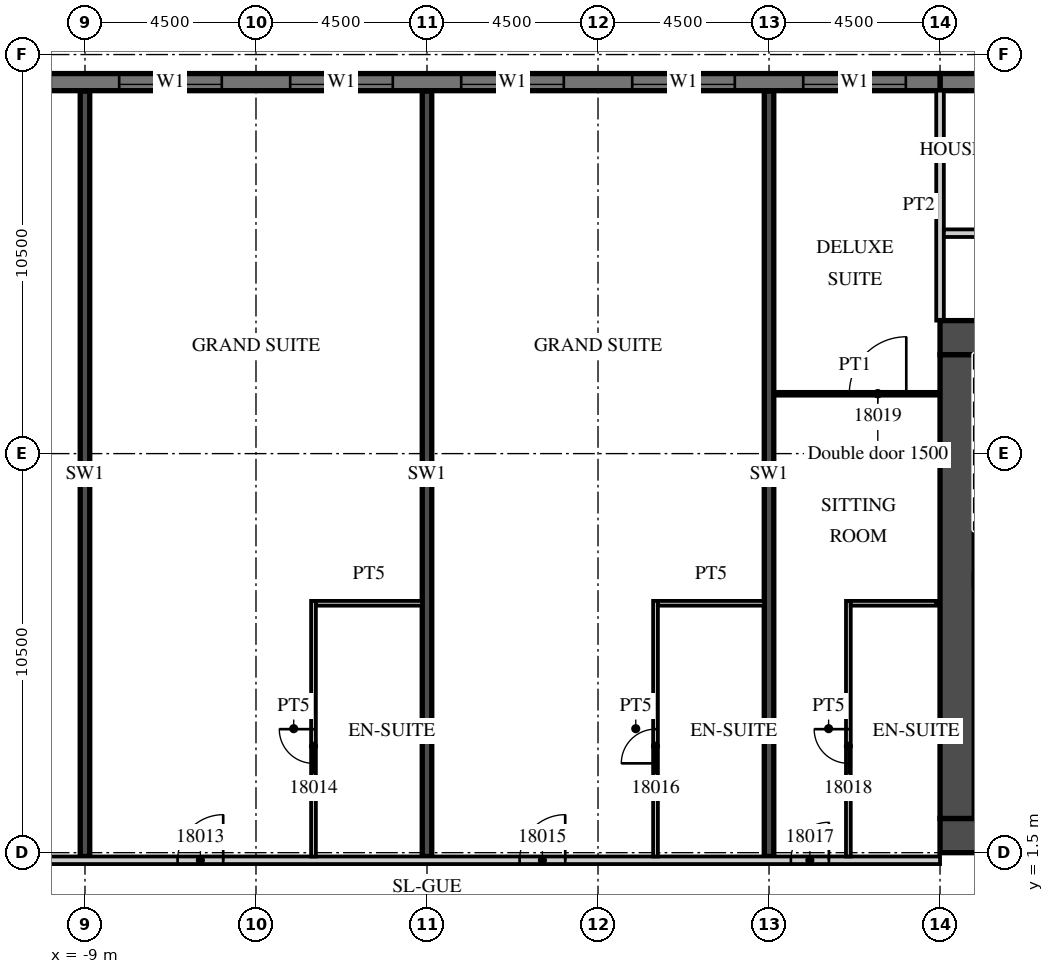
"""IFC4 building model, lengths in metres.
Left out: names, types, materials, properties, quantities, classifications, styles, units other than length and angle.
Written with IfcOpenShell. Run it as: python <this file> out.ifc"""

import sys

from ifc_helpers import new_model, si_unit, direction, frame, frame_2d, origin, place, context, subcontext, project, spatial, rectangle, extrude, element, fill, save


model = new_model("IFC4")
c1 = context("Model", 3, precision=1e-05, world=origin(), true_north=direction((0.0, 1.0)))
c2 = subcontext(c1, "Body", "Model", "MODEL_VIEW")
j1 = project(units=[si_unit("LENGTHUNIT", "METRE"), si_unit("PLANEANGLEUNIT", "RADIAN")], contexts=[c1])
p1 = place(None, origin())
s1 = spatial("IfcSite", under=j1, at=p1, CompositionType="ELEMENT")
p2 = place(p1, origin())
s2 = spatial("IfcBuilding", under=s1, at=p2, CompositionType="ELEMENT")
p3 = place(p2, frame((0.0, 0.0, 89.7)))
s3 = spatial("IfcBuildingStorey", under=s2, at=p3, CompositionType="ELEMENT", Elevation=89.7)
for number, where, z_axis, x_axis in (
    (1, (-9.0, 1.4, 0.0), (0.0, 0.0, 1.0), (0.0, 1.0, 0.0)),
    (2, (0.0, 1.4, 0.0), (0.0, 0.0, 1.0), (0.0, 1.0, 0.0)),
    (3, (9.0, 1.4, 0.0), (0.0, 0.0, 1.0), (0.0, 1.0, 0.0)),
):
    element("IfcWall", number, at=place(p3, frame(where, z_axis=z_axis, x_axis=x_axis)), inside=s3, PredefinedType="SHEAR", context=c2, shape_type="SweptSolid", body=[
        extrude(rectangle(XDim=20.14, YDim=0.25, at=frame_2d((10.07, 0.0))), origin(), (0.0, 0.0, 1.0), 3.3),
    ])
p4 = place(p3, frame((31.5, 21.775, 0.0), z_axis=(0.0, 0.0, 1.0), x_axis=(-1.0, 0.0, 0.0)))
e4 = element("IfcWall", 4, at=p4, inside=s3, PredefinedType="SOLIDWALL", context=c2, shape_type="SweptSolid", body=[
    extrude(rectangle(XDim=18.0, YDim=0.45, at=frame_2d((9.0, 0.0))), origin(), (0.0, 0.0, 1.0), 3.02),
])
p5 = place(p3, frame((13.5, 21.775, 0.0), z_axis=(0.0, 0.0, 1.0), x_axis=(-1.0, 0.0, 0.0)))
e5 = element("IfcWall", 5, at=p5, inside=s3, PredefinedType="SOLIDWALL", context=c2, shape_type="SweptSolid", body=[
    extrude(rectangle(XDim=54.5, YDim=0.45, at=frame_2d((27.25, 0.0))), origin(), (0.0, 0.0, 1.0), 3.02),
])
p6 = place(p5, frame((0.9, 0.0, 0.45)))
e6 = element("IfcOpeningElement", 6, at=p6, cuts=e5, PredefinedType="OPENING", context=c2, shape_type="SweptSolid", body=[
    extrude(rectangle(XDim=2.7, YDim=2.25, at=frame_2d((1.35, 1.125))), frame((0.0, 0.235, 0.0), z_axis=(0.0, -1.0, 0.0), x_axis=(1.0, 0.0, 0.0)), (0.0, 0.0, 1.0), 0.47),
])
p7 = place(p5, frame((5.4, 0.0, 0.45)))
e7 = element("IfcOpeningElement", 7, at=p7, cuts=e5, PredefinedType="OPENING", context=c2, shape_type="SweptSolid", body=[
    extrude(rectangle(XDim=2.7, YDim=2.25, at=frame_2d((1.35, 1.125))), frame((0.0, 0.235, 0.0), z_axis=(0.0, -1.0, 0.0), x_axis=(1.0, 0.0, 0.0)), (0.0, 0.0, 1.0), 0.47),
])
p8 = place(p5, frame((9.9, 0.0, 0.45)))
e8 = element("IfcOpeningElement", 8, at=p8, cuts=e5, PredefinedType="OPENING", context=c2, shape_type="SweptSolid", body=[
    extrude(rectangle(XDim=2.7, YDim=2.25, at=frame_2d((1.35, 1.125))), frame((0.0, 0.235, 0.0), z_axis=(0.0, -1.0, 0.0), x_axis=(1.0, 0.0, 0.0)), (0.0, 0.0, 1.0), 0.47),
])
p9 = place(p5, frame((14.4, 0.0, 0.45)))
e9 = element("IfcOpeningElement", 9, at=p9, cuts=e5, PredefinedType="OPENING", context=c2, shape_type="SweptSolid", body=[
    extrude(rectangle(XDim=2.7, YDim=2.25, at=frame_2d((1.35, 1.125))), frame((0.0, 0.235, 0.0), z_axis=(0.0, -1.0, 0.0), x_axis=(1.0, 0.0, 0.0)), (0.0, 0.0, 1.0), 0.47),
])
p10 = place(p5, frame((18.9, 0.0, 0.45)))
e10 = element("IfcOpeningElement", 10, at=p10, cuts=e5, PredefinedType="OPENING", context=c2, shape_type="SweptSolid", body=[
    extrude(rectangle(XDim=2.7, YDim=2.25, at=frame_2d((1.35, 1.125))), frame((0.0, 0.235, 0.0), z_axis=(0.0, -1.0, 0.0), x_axis=(1.0, 0.0, 0.0)), (0.0, 0.0, 1.0), 0.47),
])
p11 = place(p5, frame((23.4, 0.0, 0.45)))
e11 = element("IfcOpeningElement", 11, at=p11, cuts=e5, PredefinedType="OPENING", context=c2, shape_type="SweptSolid", body=[
    extrude(rectangle(XDim=2.7, YDim=2.25, at=frame_2d((1.35, 1.125))), frame((0.0, 0.235, 0.0), z_axis=(0.0, -1.0, 0.0), x_axis=(1.0, 0.0, 0.0)), (0.0, 0.0, 1.0), 0.47),
])
p12 = place(p5, frame((27.9, 0.0, 0.45)))
e12 = element("IfcOpeningElement", 12, at=p12, cuts=e5, PredefinedType="OPENING", context=c2, shape_type="SweptSolid", body=[
    extrude(rectangle(XDim=2.7, YDim=2.25, at=frame_2d((1.35, 1.125))), frame((0.0, 0.235, 0.0), z_axis=(0.0, -1.0, 0.0), x_axis=(1.0, 0.0, 0.0)), (0.0, 0.0, 1.0), 0.47),
])
p13 = place(p5, frame((32.4, 0.0, 0.45)))
e13 = element("IfcOpeningElement", 13, at=p13, cuts=e5, PredefinedType="OPENING", context=c2, shape_type="SweptSolid", body=[
    extrude(rectangle(XDim=2.7, YDim=2.25, at=frame_2d((1.35, 1.125))), frame((0.0, 0.235, 0.0), z_axis=(0.0, -1.0, 0.0), x_axis=(1.0, 0.0, 0.0)), (0.0, 0.0, 1.0), 0.47),
])
p14 = place(p5, frame((36.9, 0.0, 0.45)))
e14 = element("IfcOpeningElement", 14, at=p14, cuts=e5, PredefinedType="OPENING", context=c2, shape_type="SweptSolid", body=[
    extrude(rectangle(XDim=2.7, YDim=2.25, at=frame_2d((1.35, 1.125))), frame((0.0, 0.235, 0.0), z_axis=(0.0, -1.0, 0.0), x_axis=(1.0, 0.0, 0.0)), (0.0, 0.0, 1.0), 0.47),
])
p15 = place(p5, frame((41.4, 0.0, 0.45)))
e15 = element("IfcOpeningElement", 15, at=p15, cuts=e5, PredefinedType="OPENING", context=c2, shape_type="SweptSolid", body=[
    extrude(rectangle(XDim=2.7, YDim=2.25, at=frame_2d((1.35, 1.125))), frame((0.0, 0.235, 0.0), z_axis=(0.0, -1.0, 0.0), x_axis=(1.0, 0.0, 0.0)), (0.0, 0.0, 1.0), 0.47),
])
p16 = place(p5, frame((45.9, 0.0, 0.45)))
e16 = element("IfcOpeningElement", 16, at=p16, cuts=e5, PredefinedType="OPENING", context=c2, shape_type="SweptSolid", body=[
    extrude(rectangle(XDim=2.7, YDim=2.25, at=frame_2d((1.35, 1.125))), frame((0.0, 0.235, 0.0), z_axis=(0.0, -1.0, 0.0), x_axis=(1.0, 0.0, 0.0)), (0.0, 0.0, 1.0), 0.47),
])
p17 = place(p5, frame((50.4, 0.0, 0.45)))
e17 = element("IfcOpeningElement", 17, at=p17, cuts=e5, PredefinedType="OPENING", context=c2, shape_type="SweptSolid", body=[
    extrude(rectangle(XDim=2.7, YDim=2.25, at=frame_2d((1.35, 1.125))), frame((0.0, 0.235, 0.0), z_axis=(0.0, -1.0, 0.0), x_axis=(1.0, 0.0, 0.0)), (0.0, 0.0, 1.0), 0.47),
])
p18 = place(p3, frame((13.5, 15.5, 0.0), z_axis=(0.0, 0.0, 1.0), x_axis=(0.0, 1.0, 0.0)))
e18 = element("IfcWall", 18, at=p18, inside=s3, PredefinedType="PARTITIONING", context=c2, shape_type="SweptSolid", body=[
    extrude(rectangle(XDim=6.05, YDim=0.2, at=frame_2d((3.025, 0.0))), origin(), (0.0, 0.0, 1.0), 3.02),
])
p19 = place(p3, frame((-44.55, 1.3, 0.0), z_axis=(0.0, 0.0, 1.0), x_axis=(1.0, 0.0, 0.0)))
e19 = element("IfcWall", 19, at=p19, inside=s3, PredefinedType="PARTITIONING", context=c2, shape_type="SweptSolid", body=[
    extrude(rectangle(XDim=58.05, YDim=0.2, at=frame_2d((29.025, 0.0))), origin(), (0.0, 0.0, 1.0), 3.02),
])
p20 = place(p19, frame((0.525, 0.0, 0.0)))
e20 = element("IfcOpeningElement", 20, at=p20, cuts=e19, PredefinedType="OPENING", context=c2, shape_type="SweptSolid", body=[
    extrude(rectangle(XDim=1.0, YDim=2.1, at=frame_2d((0.5, 1.05))), frame((0.0, 0.11, 0.0), z_axis=(0.0, -1.0, 0.0), x_axis=(1.0, 0.0, 0.0)), (0.0, 0.0, 1.0), 0.22),
])
p21 = place(p19, frame((6.975, 0.0, 0.0)))
e21 = element("IfcOpeningElement", 21, at=p21, cuts=e19, PredefinedType="OPENING", context=c2, shape_type="SweptSolid", body=[
    extrude(rectangle(XDim=1.0, YDim=2.1, at=frame_2d((0.5, 1.05))), frame((0.0, 0.11, 0.0), z_axis=(0.0, -1.0, 0.0), x_axis=(1.0, 0.0, 0.0)), (0.0, 0.0, 1.0), 0.22),
])
p22 = place(p19, frame((11.5, 0.0, 0.0)))
e22 = element("IfcOpeningElement", 22, at=p22, cuts=e19, PredefinedType="OPENING", context=c2, shape_type="SweptSolid", body=[
    extrude(rectangle(XDim=1.0, YDim=2.1, at=frame_2d((0.5, 1.05))), frame((0.0, 0.11, 0.0), z_axis=(0.0, -1.0, 0.0), x_axis=(1.0, 0.0, 0.0)), (0.0, 0.0, 1.0), 0.22),
])
p23 = place(p19, frame((13.6, 0.0, 0.0)))
e23 = element("IfcOpeningElement", 23, at=p23, cuts=e19, PredefinedType="OPENING", context=c2, shape_type="SweptSolid", body=[
    extrude(rectangle(XDim=1.0, YDim=2.1, at=frame_2d((0.5, 1.05))), frame((0.0, 0.11, 0.0), z_axis=(0.0, -1.0, 0.0), x_axis=(1.0, 0.0, 0.0)), (0.0, 0.0, 1.0), 0.22),
])
p24 = place(p19, frame((22.912, 0.0, 0.0)))
e24 = element("IfcOpeningElement", 24, at=p24, cuts=e19, PredefinedType="OPENING", context=c2, shape_type="SweptSolid", body=[
    extrude(rectangle(XDim=1.2, YDim=2.1, at=frame_2d((0.6, 1.05))), frame((0.0, 0.11, 0.0), z_axis=(0.0, -1.0, 0.0), x_axis=(1.0, 0.0, 0.0)), (0.0, 0.0, 1.0), 0.22),
])
p25 = place(p19, frame((31.912, 0.0, 0.0)))
e25 = element("IfcOpeningElement", 25, at=p25, cuts=e19, PredefinedType="OPENING", context=c2, shape_type="SweptSolid", body=[
    extrude(rectangle(XDim=1.2, YDim=2.1, at=frame_2d((0.6, 1.05))), frame((0.0, 0.11, 0.0), z_axis=(0.0, -1.0, 0.0), x_axis=(1.0, 0.0, 0.0)), (0.0, 0.0, 1.0), 0.22),
])
p26 = place(p19, frame((37.987, 0.0, 0.0)))
e26 = element("IfcOpeningElement", 26, at=p26, cuts=e19, PredefinedType="OPENING", context=c2, shape_type="SweptSolid", body=[
    extrude(rectangle(XDim=1.2, YDim=2.1, at=frame_2d((0.6, 1.05))), frame((0.0, 0.11, 0.0), z_axis=(0.0, -1.0, 0.0), x_axis=(1.0, 0.0, 0.0)), (0.0, 0.0, 1.0), 0.22),
])
p27 = place(p19, frame((46.987, 0.0, 0.0)))
e27 = element("IfcOpeningElement", 27, at=p27, cuts=e19, PredefinedType="OPENING", context=c2, shape_type="SweptSolid", body=[
    extrude(rectangle(XDim=1.2, YDim=2.1, at=frame_2d((0.6, 1.05))), frame((0.0, 0.11, 0.0), z_axis=(0.0, -1.0, 0.0), x_axis=(1.0, 0.0, 0.0)), (0.0, 0.0, 1.0), 0.22),
])
p28 = place(p19, frame((54.125, 0.0, 0.0)))
e28 = element("IfcOpeningElement", 28, at=p28, cuts=e19, PredefinedType="OPENING", context=c2, shape_type="SweptSolid", body=[
    extrude(rectangle(XDim=1.0, YDim=2.1, at=frame_2d((0.5, 1.05))), frame((0.0, 0.11, 0.0), z_axis=(0.0, -1.0, 0.0), x_axis=(1.0, 0.0, 0.0)), (0.0, 0.0, 1.0), 0.22),
])
p29 = place(p3, frame((-2.987, 1.4, 0.0), z_axis=(0.0, 0.0, 1.0), x_axis=(0.0, 1.0, 0.0)))
e29 = element("IfcWall", 29, at=p29, inside=s3, PredefinedType="PARTITIONING", context=c2, shape_type="SweptSolid", body=[
    extrude(rectangle(XDim=6.725, YDim=0.125, at=frame_2d((3.363, 0.0))), origin(), (0.0, 0.0, 1.0), 3.02),
])
p30 = place(p29, frame((2.45, 0.0, 0.0)))
e30 = element("IfcOpeningElement", 30, at=p30, cuts=e29, PredefinedType="OPENING", context=c2, shape_type="SweptSolid", body=[
    extrude(rectangle(XDim=0.9, YDim=2.1, at=frame_2d((0.45, 1.05))), frame((0.0, 0.073, 0.0), z_axis=(0.0, -1.0, 0.0), x_axis=(1.0, 0.0, 0.0)), (0.0, 0.0, 1.0), 0.145),
])
p31 = place(p3, frame((-2.925, 8.062, 0.0), z_axis=(0.0, 0.0, 1.0), x_axis=(1.0, 0.0, 0.0)))
e31 = element("IfcWall", 31, at=p31, inside=s3, PredefinedType="PARTITIONING", context=c2, shape_type="SweptSolid", body=[
    extrude(rectangle(XDim=2.8, YDim=0.125, at=frame_2d((1.4, 0.0))), origin(), (0.0, 0.0, 1.0), 3.02),
])
p32 = place(p3, frame((6.013, 1.4, 0.0), z_axis=(0.0, 0.0, 1.0), x_axis=(0.0, 1.0, 0.0)))
e32 = element("IfcWall", 32, at=p32, inside=s3, PredefinedType="PARTITIONING", context=c2, shape_type="SweptSolid", body=[
    extrude(rectangle(XDim=6.725, YDim=0.125, at=frame_2d((3.363, 0.0))), origin(), (0.0, 0.0, 1.0), 3.02),
])
p33 = place(p32, frame((2.45, 0.0, 0.0)))
e33 = element("IfcOpeningElement", 33, at=p33, cuts=e32, PredefinedType="OPENING", context=c2, shape_type="SweptSolid", body=[
    extrude(rectangle(XDim=0.9, YDim=2.1, at=frame_2d((0.45, 1.05))), frame((0.0, 0.073, 0.0), z_axis=(0.0, -1.0, 0.0), x_axis=(1.0, 0.0, 0.0)), (0.0, 0.0, 1.0), 0.145),
])
p34 = place(p3, frame((6.075, 8.062, 0.0), z_axis=(0.0, 0.0, 1.0), x_axis=(1.0, 0.0, 0.0)))
e34 = element("IfcWall", 34, at=p34, inside=s3, PredefinedType="PARTITIONING", context=c2, shape_type="SweptSolid", body=[
    extrude(rectangle(XDim=2.8, YDim=0.125, at=frame_2d((1.4, 0.0))), origin(), (0.0, 0.0, 1.0), 3.02),
])
p35 = place(p3, frame((11.088, 1.4, 0.0), z_axis=(0.0, 0.0, 1.0), x_axis=(0.0, 1.0, 0.0)))
e35 = element("IfcWall", 35, at=p35, inside=s3, PredefinedType="PARTITIONING", context=c2, shape_type="SweptSolid", body=[
    extrude(rectangle(XDim=6.725, YDim=0.125, at=frame_2d((3.363, 0.0))), origin(), (0.0, 0.0, 1.0), 3.02),
])
p36 = place(p35, frame((2.45, 0.0, 0.0)))
e36 = element("IfcOpeningElement", 36, at=p36, cuts=e35, PredefinedType="OPENING", context=c2, shape_type="SweptSolid", body=[
    extrude(rectangle(XDim=0.9, YDim=2.1, at=frame_2d((0.45, 1.05))), frame((0.0, 0.073, 0.0), z_axis=(0.0, -1.0, 0.0), x_axis=(1.0, 0.0, 0.0)), (0.0, 0.0, 1.0), 0.145),
])
p37 = place(p3, frame((11.15, 8.062, 0.0), z_axis=(0.0, 0.0, 1.0), x_axis=(1.0, 0.0, 0.0)))
e37 = element("IfcWall", 37, at=p37, inside=s3, PredefinedType="PARTITIONING", context=c2, shape_type="SweptSolid", body=[
    extrude(rectangle(XDim=2.25, YDim=0.125, at=frame_2d((1.125, 0.0))), origin(), (0.0, 0.0, 1.0), 3.02),
])
p38 = place(p3, frame((9.125, 13.575, 0.0), z_axis=(0.0, 0.0, 1.0), x_axis=(1.0, 0.0, 0.0)))
e38 = element("IfcWall", 38, at=p38, inside=s3, PredefinedType="PARTITIONING", context=c2, shape_type="SweptSolid", body=[
    extrude(rectangle(XDim=4.275, YDim=0.1, at=frame_2d((2.137, 0.0))), origin(), (0.0, 0.0, 1.0), 3.02),
])
p39 = place(p38, frame((1.987, 0.0, 0.0)))
e39 = element("IfcOpeningElement", 39, at=p39, cuts=e38, PredefinedType="OPENING", context=c2, shape_type="SweptSolid", body=[
    extrude(rectangle(XDim=1.5, YDim=2.1, at=frame_2d((0.75, 1.05))), frame((0.0, 0.06, 0.0), z_axis=(0.0, -1.0, 0.0), x_axis=(1.0, 0.0, 0.0)), (0.0, 0.0, 1.0), 0.12),
])
p40 = place(p3, frame((13.5, 1.95, 0.0), z_axis=(0.0, 0.0, 1.0), x_axis=(1.0, 0.0, 0.0)))
e40 = element("IfcWall", 40, at=p40, inside=s3, PredefinedType="SHEAR", context=c2, shape_type="SweptSolid", body=[
    extrude(rectangle(XDim=18.0, YDim=0.9, at=frame_2d((9.0, 0.0))), origin(), (0.0, 0.0, 1.0), 3.02),
])
p41 = place(p40, frame((1.475, 0.0, 0.0)))
e41 = element("IfcOpeningElement", 41, at=p41, cuts=e40, PredefinedType="OPENING", context=c2, shape_type="SweptSolid", body=[
    extrude(rectangle(XDim=1.8, YDim=2.1, at=frame_2d((0.9, 1.05))), frame((0.0, 0.46, 0.0), z_axis=(0.0, -1.0, 0.0), x_axis=(1.0, 0.0, 0.0)), (0.0, 0.0, 1.0), 0.92),
])
p42 = place(p3, frame((13.5, 15.05, 0.0), z_axis=(0.0, 0.0, 1.0), x_axis=(1.0, 0.0, 0.0)))
e42 = element("IfcWall", 42, at=p42, inside=s3, PredefinedType="SHEAR", context=c2, shape_type="SweptSolid", body=[
    extrude(rectangle(XDim=6.8, YDim=0.9, at=frame_2d((3.4, 0.0))), origin(), (0.0, 0.0, 1.0), 3.02),
])
p43 = place(p42, frame((4.725, 0.0, 0.0)))
e43 = element("IfcOpeningElement", 43, at=p43, cuts=e42, PredefinedType="OPENING", context=c2, shape_type="SweptSolid", body=[
    extrude(rectangle(XDim=1.2, YDim=2.1, at=frame_2d((0.6, 1.05))), frame((0.0, 0.46, 0.0), z_axis=(0.0, -1.0, 0.0), x_axis=(1.0, 0.0, 0.0)), (0.0, 0.0, 1.0), 0.92),
])
p44 = place(p3, frame((13.95, 2.4, 0.0), z_axis=(0.0, 0.0, 1.0), x_axis=(0.0, 1.0, 0.0)))
e44 = element("IfcWall", 44, at=p44, inside=s3, PredefinedType="SHEAR", context=c2, shape_type="SweptSolid", body=[
    extrude(rectangle(XDim=12.2, YDim=0.9, at=frame_2d((6.1, 0.0))), origin(), (0.0, 0.0, 1.0), 3.02),
])
p45 = place(p3, frame((13.6, 17.8, 0.0), z_axis=(0.0, 0.0, 1.0), x_axis=(1.0, 0.0, 0.0)))
e45 = element("IfcWall", 45, at=p45, inside=s3, PredefinedType="PARTITIONING", context=c2, shape_type="SweptSolid", body=[
    extrude(rectangle(XDim=30.95, YDim=0.2, at=frame_2d((15.475, 0.0))), origin(), (0.0, 0.0, 1.0), 3.02),
])
p46 = place(p45, frame((17.812, 0.0, 0.0)))
e46 = element("IfcOpeningElement", 46, at=p46, cuts=e45, PredefinedType="OPENING", context=c2, shape_type="SweptSolid", body=[
    extrude(rectangle(XDim=0.9, YDim=2.1, at=frame_2d((0.45, 1.05))), frame((0.0, 0.11, 0.0), z_axis=(0.0, -1.0, 0.0), x_axis=(1.0, 0.0, 0.0)), (0.0, 0.0, 1.0), 0.22),
])
p47 = place(p45, frame((9.512, 0.0, 0.0)))
e47 = element("IfcOpeningElement", 47, at=p47, cuts=e45, PredefinedType="OPENING", context=c2, shape_type="SweptSolid", body=[
    extrude(rectangle(XDim=0.9, YDim=2.1, at=frame_2d((0.45, 1.05))), frame((0.0, 0.11, 0.0), z_axis=(0.0, -1.0, 0.0), x_axis=(1.0, 0.0, 0.0)), (0.0, 0.0, 1.0), 0.22),
])
p48 = place(p6, origin())
e48 = element("IfcWindow", 48, at=p48, inside=s3, PartitioningType="SINGLE_PANEL", PredefinedType="WINDOW", context=c2, shape_type="SweptSolid", body=[
    extrude(rectangle(XDim=2.7, YDim=2.25, at=frame_2d((1.35, 1.125))), frame((0.0, 0.09, 0.0), z_axis=(0.0, -1.0, 0.0), x_axis=(1.0, 0.0, 0.0)), (0.0, 0.0, 1.0), 0.06),
])
fill(e6, e48)
p49 = place(p7, origin())
e49 = element("IfcWindow", 49, at=p49, inside=s3, PartitioningType="SINGLE_PANEL", PredefinedType="WINDOW", context=c2, shape_type="SweptSolid", body=[
    extrude(rectangle(XDim=2.7, YDim=2.25, at=frame_2d((1.35, 1.125))), frame((0.0, 0.09, 0.0), z_axis=(0.0, -1.0, 0.0), x_axis=(1.0, 0.0, 0.0)), (0.0, 0.0, 1.0), 0.06),
])
fill(e7, e49)
p50 = place(p8, origin())
e50 = element("IfcWindow", 50, at=p50, inside=s3, PartitioningType="SINGLE_PANEL", PredefinedType="WINDOW", context=c2, shape_type="SweptSolid", body=[
    extrude(rectangle(XDim=2.7, YDim=2.25, at=frame_2d((1.35, 1.125))), frame((0.0, 0.09, 0.0), z_axis=(0.0, -1.0, 0.0), x_axis=(1.0, 0.0, 0.0)), (0.0, 0.0, 1.0), 0.06),
])
fill(e8, e50)
p51 = place(p9, origin())
e51 = element("IfcWindow", 51, at=p51, inside=s3, PartitioningType="SINGLE_PANEL", PredefinedType="WINDOW", context=c2, shape_type="SweptSolid", body=[
    extrude(rectangle(XDim=2.7, YDim=2.25, at=frame_2d((1.35, 1.125))), frame((0.0, 0.09, 0.0), z_axis=(0.0, -1.0, 0.0), x_axis=(1.0, 0.0, 0.0)), (0.0, 0.0, 1.0), 0.06),
])
fill(e9, e51)
p52 = place(p10, origin())
e52 = element("IfcWindow", 52, at=p52, inside=s3, PartitioningType="SINGLE_PANEL", PredefinedType="WINDOW", context=c2, shape_type="SweptSolid", body=[
    extrude(rectangle(XDim=2.7, YDim=2.25, at=frame_2d((1.35, 1.125))), frame((0.0, 0.09, 0.0), z_axis=(0.0, -1.0, 0.0), x_axis=(1.0, 0.0, 0.0)), (0.0, 0.0, 1.0), 0.06),
])
fill(e10, e52)
p53 = place(p26, origin())
e53 = element("IfcDoor", 53, at=p53, inside=s3, OperationType="SINGLE_SWING_RIGHT", PredefinedType="DOOR", context=c2, shape_type="SweptSolid", body=[
    extrude(rectangle(XDim=1.2, YDim=2.1, at=frame_2d((0.6, 1.05))), frame((0.0, 0.025, 0.0), z_axis=(0.0, -1.0, 0.0), x_axis=(1.0, 0.0, 0.0)), (0.0, 0.0, 1.0), 0.05),
])
fill(e26, e53)
p54 = place(p30, origin())
e54 = element("IfcDoor", 54, at=p54, inside=s3, OperationType="SINGLE_SWING_RIGHT", PredefinedType="DOOR", context=c2, shape_type="SweptSolid", body=[
    extrude(rectangle(XDim=0.9, YDim=2.1, at=frame_2d((0.45, 1.05))), frame((0.0, 0.025, 0.0), z_axis=(0.0, -1.0, 0.0), x_axis=(1.0, 0.0, 0.0)), (0.0, 0.0, 1.0), 0.05),
])
fill(e30, e54)
p55 = place(p27, origin())
e55 = element("IfcDoor", 55, at=p55, inside=s3, OperationType="SINGLE_SWING_RIGHT", PredefinedType="DOOR", context=c2, shape_type="SweptSolid", body=[
    extrude(rectangle(XDim=1.2, YDim=2.1, at=frame_2d((0.6, 1.05))), frame((0.0, 0.025, 0.0), z_axis=(0.0, -1.0, 0.0), x_axis=(1.0, 0.0, 0.0)), (0.0, 0.0, 1.0), 0.05),
])
fill(e27, e55)
p56 = place(p33, origin())
e56 = element("IfcDoor", 56, at=p56, inside=s3, OperationType="SINGLE_SWING_LEFT", PredefinedType="DOOR", context=c2, shape_type="SweptSolid", body=[
    extrude(rectangle(XDim=0.9, YDim=2.1, at=frame_2d((0.45, 1.05))), frame((0.0, 0.025, 0.0), z_axis=(0.0, -1.0, 0.0), x_axis=(1.0, 0.0, 0.0)), (0.0, 0.0, 1.0), 0.05),
])
fill(e33, e56)
p57 = place(p28, origin())
e57 = element("IfcDoor", 57, at=p57, inside=s3, OperationType="SINGLE_SWING_RIGHT", PredefinedType="DOOR", context=c2, shape_type="SweptSolid", body=[
    extrude(rectangle(XDim=1.0, YDim=2.1, at=frame_2d((0.5, 1.05))), frame((0.0, 0.025, 0.0), z_axis=(0.0, -1.0, 0.0), x_axis=(1.0, 0.0, 0.0)), (0.0, 0.0, 1.0), 0.05),
])
fill(e28, e57)
p58 = place(p36, origin())
e58 = element("IfcDoor", 58, at=p58, inside=s3, OperationType="SINGLE_SWING_RIGHT", PredefinedType="DOOR", context=c2, shape_type="SweptSolid", body=[
    extrude(rectangle(XDim=0.9, YDim=2.1, at=frame_2d((0.45, 1.05))), frame((0.0, 0.025, 0.0), z_axis=(0.0, -1.0, 0.0), x_axis=(1.0, 0.0, 0.0)), (0.0, 0.0, 1.0), 0.05),
])
fill(e36, e58)
p59 = place(p39, origin())
e59 = element("IfcDoor", 59, at=p59, inside=s3, OperationType="SINGLE_SWING_RIGHT", PredefinedType="DOOR", context=c2, shape_type="SweptSolid", body=[
    extrude(rectangle(XDim=1.5, YDim=2.1, at=frame_2d((0.75, 1.05))), frame((0.0, 0.025, 0.0), z_axis=(0.0, -1.0, 0.0), x_axis=(1.0, 0.0, 0.0)), (0.0, 0.0, 1.0), 0.05),
])
fill(e39, e59)
save(model, sys.argv[1])
